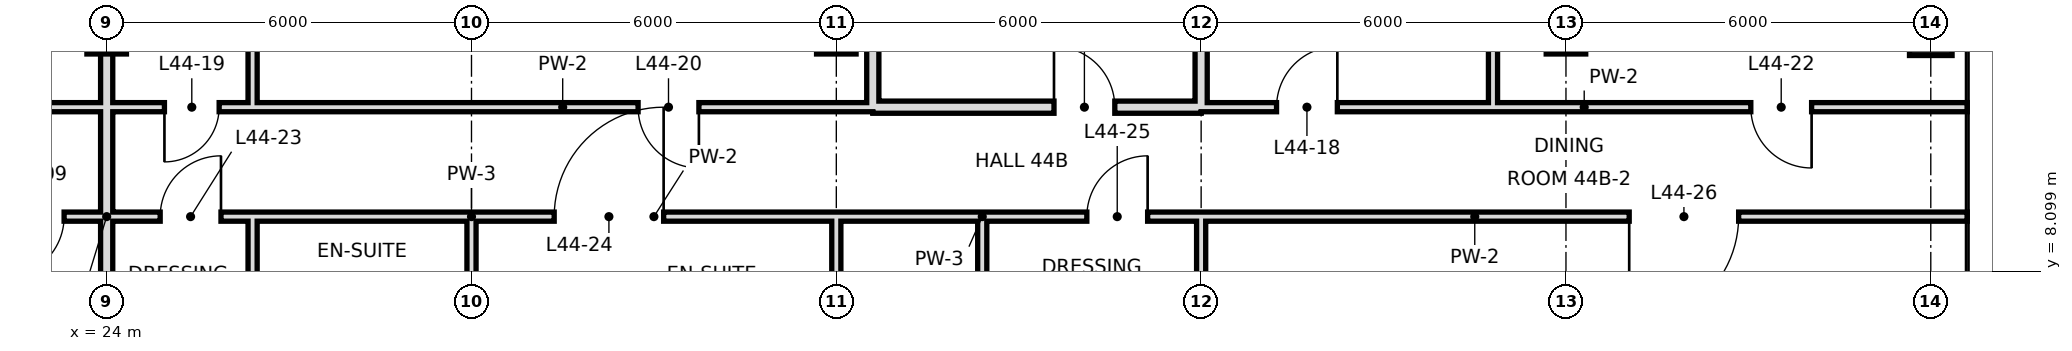
"""IFC4 building model, lengths in metres.
Left out: names, types, materials, properties, quantities, classifications, styles, units other than length and angle.
Written with IfcOpenShell. Run it as: python <this file> out.ifc"""

import sys

from ifc_helpers import new_model, si_unit, direction, frame, frame_2d, origin, origin_2d, place, context, subcontext, project, spatial, rectangle, hollow_rectangle, extrude, element, fill, save


model = new_model("IFC4")
c1 = context("Model", 3, precision=1e-05, world=origin(), true_north=direction((0.0, 1.0)))
c2 = subcontext(c1, "Body", "Model", "MODEL_VIEW")
j1 = project(units=[si_unit("LENGTHUNIT", "METRE"), si_unit("PLANEANGLEUNIT", "RADIAN")], contexts=[c1])
p1 = place(None, origin())
s1 = spatial("IfcSite", under=j1, at=p1, CompositionType="ELEMENT")
p2 = place(p1, origin())
s2 = spatial("IfcBuilding", under=s1, at=p2, CompositionType="ELEMENT")
p3 = place(p2, frame((0.0, 0.0, 192.0)))
s3 = spatial("IfcBuildingStorey", under=s2, at=p3, CompositionType="ELEMENT", Elevation=192.0)
for number, where, z_axis, x_axis in (
    (1, (24.0, 12.0, 0.0), (0.0, 0.0, 1.0), (1.0, 0.0, 0.0)),
    (2, (36.0, 12.0, 0.0), (0.0, 0.0, 1.0), (1.0, 0.0, 0.0)),
    (3, (48.0, 12.0, 0.0), (0.0, 0.0, 1.0), (1.0, 0.0, 0.0)),
):
    element("IfcColumn", number, at=place(p3, frame(where, z_axis=z_axis, x_axis=x_axis)), inside=s3, PredefinedType="COLUMN", context=c2, shape_type="SweptSolid", body=[
        extrude(hollow_rectangle(XDim=0.65, YDim=0.65, WallThickness=0.032, at=origin_2d()), origin(), (0.0, 0.0, 1.0), 3.6),
    ])
p4 = place(p3, frame((54.0, 12.0, -0.3), z_axis=(0.0, 0.0, 1.0), x_axis=(1.0, 0.0, 0.0)))
e4 = element("IfcColumn", 4, at=p4, inside=s3, PredefinedType="COLUMN", context=c2, shape_type="SweptSolid", body=[
    extrude(hollow_rectangle(XDim=0.7, YDim=0.7, WallThickness=0.036, at=origin_2d()), origin(), (0.0, 0.0, 1.0), 3.9),
])
p5 = place(p3, frame((24.0, 0.0, 0.0), z_axis=(0.0, 0.0, 1.0), x_axis=(0.0, 1.0, 0.0)))
e5 = element("IfcWall", 5, at=p5, inside=s3, PredefinedType="SOLIDWALL", context=c2, shape_type="SweptSolid", body=[
    extrude(rectangle(XDim=15.3, YDim=0.2, at=frame_2d((7.65, 0.0))), origin(), (0.0, 0.0, 1.0), 2.72),
])
p6 = place(p3, frame((26.4, 6.0, 0.0), z_axis=(0.0, 0.0, 1.0), x_axis=(0.0, 1.0, 0.0)))
e6 = element("IfcWall", 6, at=p6, inside=s3, PredefinedType="PARTITIONING", context=c2, shape_type="SweptSolid", body=[
    extrude(rectangle(XDim=3.0, YDim=0.15, at=frame_2d((1.5, 0.0))), origin(), (0.0, 0.0, 1.0), 3.42),
])
p7 = place(p3, frame((26.4, 10.8, 0.0), z_axis=(0.0, 0.0, 1.0), x_axis=(0.0, 1.0, 0.0)))
e7 = element("IfcWall", 7, at=p7, inside=s3, PredefinedType="PARTITIONING", context=c2, shape_type="SweptSolid", body=[
    extrude(rectangle(XDim=4.5, YDim=0.15, at=frame_2d((2.25, 0.0))), origin(), (0.0, 0.0, 1.0), 3.42),
])
for number, where, z_axis, x_axis in (
    (8, (30.0, 6.0, 0.0), (0.0, 0.0, 1.0), (0.0, 1.0, 0.0)),
    (9, (36.0, 6.0, 0.0), (0.0, 0.0, 1.0), (0.0, 1.0, 0.0)),
):
    element("IfcWall", number, at=place(p3, frame(where, z_axis=z_axis, x_axis=x_axis)), inside=s3, PredefinedType="PARTITIONING", context=c2, shape_type="SweptSolid", body=[
        extrude(rectangle(XDim=3.0, YDim=0.15, at=frame_2d((1.5, 0.0))), origin(), (0.0, 0.0, 1.0), 2.72),
    ])
p8 = place(p3, frame((36.6, 10.8, 0.0), z_axis=(0.0, 0.0, 1.0), x_axis=(0.0, 1.0, 0.0)))
e10 = element("IfcWall", 10, at=p8, inside=s3, PredefinedType="SOLIDWALL", context=c2, shape_type="SweptSolid", body=[
    extrude(rectangle(XDim=4.5, YDim=0.2, at=frame_2d((2.25, 0.0))), origin(), (0.0, 0.0, 1.0), 2.72),
])
p9 = place(p3, frame((38.4, 6.0, 0.0), z_axis=(0.0, 0.0, 1.0), x_axis=(0.0, 1.0, 0.0)))
e11 = element("IfcWall", 11, at=p9, inside=s3, PredefinedType="PARTITIONING", context=c2, shape_type="SweptSolid", body=[
    extrude(rectangle(XDim=3.0, YDim=0.15, at=frame_2d((1.5, 0.0))), origin(), (0.0, 0.0, 1.0), 3.42),
])
p10 = place(p3, frame((42.0, 10.8, 0.0), z_axis=(0.0, 0.0, 1.0), x_axis=(0.0, 1.0, 0.0)))
e12 = element("IfcWall", 12, at=p10, inside=s3, PredefinedType="SOLIDWALL", context=c2, shape_type="SweptSolid", body=[
    extrude(rectangle(XDim=4.5, YDim=0.2, at=frame_2d((2.25, 0.0))), origin(), (0.0, 0.0, 1.0), 2.72),
])
p11 = place(p3, frame((42.0, -0.6, 0.0), z_axis=(0.0, 0.0, 1.0), x_axis=(0.0, 1.0, 0.0)))
e13 = element("IfcWall", 13, at=p11, inside=s3, PredefinedType="PARTITIONING", context=c2, shape_type="SweptSolid", body=[
    extrude(rectangle(XDim=9.6, YDim=0.15, at=frame_2d((4.8, 0.0))), origin(), (0.0, 0.0, 1.0), 2.72),
])
p12 = place(p3, frame((46.8, 10.8, 0.0), z_axis=(0.0, 0.0, 1.0), x_axis=(0.0, 1.0, 0.0)))
e14 = element("IfcWall", 14, at=p12, inside=s3, PredefinedType="PARTITIONING", context=c2, shape_type="SweptSolid", body=[
    extrude(rectangle(XDim=4.5, YDim=0.15, at=frame_2d((2.25, 0.0))), origin(), (0.0, 0.0, 1.0), 3.42),
])
p13 = place(p3, frame((36.6, 10.8, 0.0), z_axis=(0.0, 0.0, 1.0), x_axis=(1.0, 0.0, 0.0)))
e15 = element("IfcWall", 15, at=p13, inside=s3, PredefinedType="SOLIDWALL", context=c2, shape_type="SweptSolid", body=[
    extrude(rectangle(XDim=5.4, YDim=0.2, at=frame_2d((2.7, 0.0))), origin(), (0.0, 0.0, 1.0), 2.72),
])
p14 = place(p13, frame((2.98, 0.0, 0.0)))
e16 = element("IfcOpeningElement", 16, at=p14, cuts=e15, PredefinedType="OPENING", context=c2, shape_type="SweptSolid", body=[
    extrude(rectangle(XDim=1.0, YDim=2.4, at=frame_2d((0.5, 1.2))), frame((0.0, 0.11, 0.0), z_axis=(0.0, -1.0, 0.0), x_axis=(1.0, 0.0, 0.0)), (0.0, 0.0, 1.0), 0.22),
])
p15 = place(p3, frame((7.8, 10.8, 0.0), z_axis=(0.0, 0.0, 1.0), x_axis=(1.0, 0.0, 0.0)))
e17 = element("IfcWall", 17, at=p15, inside=s3, PredefinedType="PARTITIONING", context=c2, shape_type="SweptSolid", body=[
    extrude(rectangle(XDim=16.2, YDim=0.15, at=frame_2d((8.1, 0.0))), origin(), (0.0, 0.0, 1.0), 3.42),
])
p16 = place(p15, frame((2.5, 0.0, 0.0)))
e18 = element("IfcOpeningElement", 18, at=p16, cuts=e17, PredefinedType="OPENING", context=c2, shape_type="SweptSolid", body=[
    extrude(rectangle(XDim=1.0, YDim=2.4, at=frame_2d((0.5, 1.2))), frame((0.0, 0.085, 0.0), z_axis=(0.0, -1.0, 0.0), x_axis=(1.0, 0.0, 0.0)), (0.0, 0.0, 1.0), 0.17),
])
p17 = place(p15, frame((8.86, 0.0, 0.0)))
e19 = element("IfcOpeningElement", 19, at=p17, cuts=e17, PredefinedType="OPENING", context=c2, shape_type="SweptSolid", body=[
    extrude(rectangle(XDim=1.0, YDim=2.4, at=frame_2d((0.5, 1.2))), frame((0.0, 0.085, 0.0), z_axis=(0.0, -1.0, 0.0), x_axis=(1.0, 0.0, 0.0)), (0.0, 0.0, 1.0), 0.17),
])
p18 = place(p3, frame((26.4, 10.8, 0.0), z_axis=(0.0, 0.0, 1.0), x_axis=(1.0, 0.0, 0.0)))
e20 = element("IfcWall", 20, at=p18, inside=s3, PredefinedType="PARTITIONING", context=c2, shape_type="SweptSolid", body=[
    extrude(rectangle(XDim=10.2, YDim=0.15, at=frame_2d((5.1, 0.0))), origin(), (0.0, 0.0, 1.0), 3.42),
])
p19 = place(p18, frame((6.34, 0.0, 0.0)))
e21 = element("IfcOpeningElement", 21, at=p19, cuts=e20, PredefinedType="OPENING", context=c2, shape_type="SweptSolid", body=[
    extrude(rectangle(XDim=1.0, YDim=2.4, at=frame_2d((0.5, 1.2))), frame((0.0, 0.085, 0.0), z_axis=(0.0, -1.0, 0.0), x_axis=(1.0, 0.0, 0.0)), (0.0, 0.0, 1.0), 0.17),
])
p20 = place(p3, frame((42.0, 10.8, 0.0), z_axis=(0.0, 0.0, 1.0), x_axis=(1.0, 0.0, 0.0)))
e22 = element("IfcWall", 22, at=p20, inside=s3, PredefinedType="PARTITIONING", context=c2, shape_type="SweptSolid", body=[
    extrude(rectangle(XDim=12.6, YDim=0.15, at=frame_2d((6.3, 0.0))), origin(), (0.0, 0.0, 1.0), 3.42),
])
p21 = place(p20, frame((1.24, 0.0, 0.0)))
e23 = element("IfcOpeningElement", 23, at=p21, cuts=e22, PredefinedType="OPENING", context=c2, shape_type="SweptSolid", body=[
    extrude(rectangle(XDim=1.0, YDim=2.4, at=frame_2d((0.5, 1.2))), frame((0.0, 0.085, 0.0), z_axis=(0.0, -1.0, 0.0), x_axis=(1.0, 0.0, 0.0)), (0.0, 0.0, 1.0), 0.17),
])
p22 = place(p20, frame((9.04, 0.0, 0.0)))
e24 = element("IfcOpeningElement", 24, at=p22, cuts=e22, PredefinedType="OPENING", context=c2, shape_type="SweptSolid", body=[
    extrude(rectangle(XDim=1.0, YDim=2.4, at=frame_2d((0.5, 1.2))), frame((0.0, 0.085, 0.0), z_axis=(0.0, -1.0, 0.0), x_axis=(1.0, 0.0, 0.0)), (0.0, 0.0, 1.0), 0.17),
])
p23 = place(p3, frame((24.0, 10.8, 0.0), z_axis=(0.0, 0.0, 1.0), x_axis=(1.0, 0.0, 0.0)))
e25 = element("IfcWall", 25, at=p23, inside=s3, PredefinedType="PARTITIONING", context=c2, shape_type="SweptSolid", body=[
    extrude(rectangle(XDim=2.4, YDim=0.15, at=frame_2d((1.2, 0.0))), origin(), (0.0, 0.0, 1.0), 3.42),
])
p24 = place(p23, frame((0.95, 0.0, 0.0)))
e26 = element("IfcOpeningElement", 26, at=p24, cuts=e25, PredefinedType="OPENING", context=c2, shape_type="SweptSolid", body=[
    extrude(rectangle(XDim=0.9, YDim=2.4, at=frame_2d((0.45, 1.2))), frame((0.0, 0.085, 0.0), z_axis=(0.0, -1.0, 0.0), x_axis=(1.0, 0.0, 0.0)), (0.0, 0.0, 1.0), 0.17),
])
p25 = place(p3, frame((21.6, 9.0, 0.0), z_axis=(0.0, 0.0, 1.0), x_axis=(1.0, 0.0, 0.0)))
e27 = element("IfcWall", 27, at=p25, inside=s3, PredefinedType="PARTITIONING", context=c2, shape_type="SweptSolid", body=[
    extrude(rectangle(XDim=4.8, YDim=0.15, at=frame_2d((2.4, 0.0))), origin(), (0.0, 0.0, 1.0), 3.42),
])
p26 = place(p25, frame((0.7, 0.0, 0.0)))
e28 = element("IfcOpeningElement", 28, at=p26, cuts=e27, PredefinedType="OPENING", context=c2, shape_type="SweptSolid", body=[
    extrude(rectangle(XDim=1.0, YDim=2.4, at=frame_2d((0.5, 1.2))), frame((0.0, 0.085, 0.0), z_axis=(0.0, -1.0, 0.0), x_axis=(1.0, 0.0, 0.0)), (0.0, 0.0, 1.0), 0.17),
])
p27 = place(p25, frame((3.28, 0.0, 0.0)))
e29 = element("IfcOpeningElement", 29, at=p27, cuts=e27, PredefinedType="OPENING", context=c2, shape_type="SweptSolid", body=[
    extrude(rectangle(XDim=1.0, YDim=2.4, at=frame_2d((0.5, 1.2))), frame((0.0, 0.085, 0.0), z_axis=(0.0, -1.0, 0.0), x_axis=(1.0, 0.0, 0.0)), (0.0, 0.0, 1.0), 0.17),
])
p28 = place(p3, frame((30.0, 9.0, 0.0), z_axis=(0.0, 0.0, 1.0), x_axis=(1.0, 0.0, 0.0)))
e30 = element("IfcWall", 30, at=p28, inside=s3, PredefinedType="PARTITIONING", context=c2, shape_type="SweptSolid", body=[
    extrude(rectangle(XDim=6.0, YDim=0.15, at=frame_2d((3.0, 0.0))), origin(), (0.0, 0.0, 1.0), 3.42),
])
p29 = place(p28, frame((1.36, 0.0, 0.0)))
e31 = element("IfcOpeningElement", 31, at=p29, cuts=e30, PredefinedType="OPENING", context=c2, shape_type="SweptSolid", body=[
    extrude(rectangle(XDim=1.8, YDim=2.4, at=frame_2d((0.9, 1.2))), frame((0.0, 0.085, 0.0), z_axis=(0.0, -1.0, 0.0), x_axis=(1.0, 0.0, 0.0)), (0.0, 0.0, 1.0), 0.17),
])
p30 = place(p3, frame((38.4, 9.0, 0.0), z_axis=(0.0, 0.0, 1.0), x_axis=(1.0, 0.0, 0.0)))
e32 = element("IfcWall", 32, at=p30, inside=s3, PredefinedType="PARTITIONING", context=c2, shape_type="SweptSolid", body=[
    extrude(rectangle(XDim=16.2, YDim=0.15, at=frame_2d((8.1, 0.0))), origin(), (0.0, 0.0, 1.0), 3.42),
])
p31 = place(p30, frame((1.72, 0.0, 0.0)))
e33 = element("IfcOpeningElement", 33, at=p31, cuts=e32, PredefinedType="OPENING", context=c2, shape_type="SweptSolid", body=[
    extrude(rectangle(XDim=1.0, YDim=2.4, at=frame_2d((0.5, 1.2))), frame((0.0, 0.085, 0.0), z_axis=(0.0, -1.0, 0.0), x_axis=(1.0, 0.0, 0.0)), (0.0, 0.0, 1.0), 0.17),
])
p32 = place(p30, frame((10.64, 0.0, 0.0)))
e34 = element("IfcOpeningElement", 34, at=p32, cuts=e32, PredefinedType="OPENING", context=c2, shape_type="SweptSolid", body=[
    extrude(rectangle(XDim=1.8, YDim=2.4, at=frame_2d((0.9, 1.2))), frame((0.0, 0.085, 0.0), z_axis=(0.0, -1.0, 0.0), x_axis=(1.0, 0.0, 0.0)), (0.0, 0.0, 1.0), 0.17),
])
p33 = place(p3, frame((26.4, 9.0, 0.0), z_axis=(0.0, 0.0, 1.0), x_axis=(1.0, 0.0, 0.0)))
e35 = element("IfcWall", 35, at=p33, inside=s3, PredefinedType="PARTITIONING", context=c2, shape_type="SweptSolid", body=[
    extrude(rectangle(XDim=3.6, YDim=0.15, at=frame_2d((1.8, 0.0))), origin(), (0.0, 0.0, 1.0), 3.42),
])
p34 = place(p3, frame((36.0, 9.0, 0.0), z_axis=(0.0, 0.0, 1.0), x_axis=(1.0, 0.0, 0.0)))
e36 = element("IfcWall", 36, at=p34, inside=s3, PredefinedType="PARTITIONING", context=c2, shape_type="SweptSolid", body=[
    extrude(rectangle(XDim=2.4, YDim=0.15, at=frame_2d((1.2, 0.0))), origin(), (0.0, 0.0, 1.0), 3.42),
])
p35 = place(p26, frame((1.0, 0.0, 0.0), z_axis=(0.0, 0.0, 1.0), x_axis=(-1.0, 0.0, 0.0)))
e37 = element("IfcDoor", 37, at=p35, inside=s3, OperationType="SINGLE_SWING_RIGHT", PredefinedType="DOOR", context=c2, shape_type="SweptSolid", body=[
    extrude(rectangle(XDim=1.0, YDim=2.4, at=frame_2d((0.5, 1.2))), frame((0.0, 0.025, 0.0), z_axis=(0.0, -1.0, 0.0), x_axis=(1.0, 0.0, 0.0)), (0.0, 0.0, 1.0), 0.05),
])
fill(e28, e37)
p36 = place(p21, frame((1.0, 0.0, 0.0), z_axis=(0.0, 0.0, 1.0), x_axis=(-1.0, 0.0, 0.0)))
e38 = element("IfcDoor", 38, at=p36, inside=s3, OperationType="SINGLE_SWING_LEFT", PredefinedType="DOOR", context=c2, shape_type="SweptSolid", body=[
    extrude(rectangle(XDim=1.0, YDim=2.4, at=frame_2d((0.5, 1.2))), frame((0.0, 0.025, 0.0), z_axis=(0.0, -1.0, 0.0), x_axis=(1.0, 0.0, 0.0)), (0.0, 0.0, 1.0), 0.05),
])
fill(e23, e38)
p37 = place(p24, frame((0.9, 0.0, 0.0), z_axis=(0.0, 0.0, 1.0), x_axis=(-1.0, 0.0, 0.0)))
e39 = element("IfcDoor", 39, at=p37, inside=s3, OperationType="SINGLE_SWING_RIGHT", PredefinedType="DOOR", context=c2, shape_type="SweptSolid", body=[
    extrude(rectangle(XDim=0.9, YDim=2.4, at=frame_2d((0.45, 1.2))), frame((0.0, 0.025, 0.0), z_axis=(0.0, -1.0, 0.0), x_axis=(1.0, 0.0, 0.0)), (0.0, 0.0, 1.0), 0.05),
])
fill(e26, e39)
p38 = place(p19, origin())
e40 = element("IfcDoor", 40, at=p38, inside=s3, OperationType="SINGLE_SWING_RIGHT", PredefinedType="DOOR", context=c2, shape_type="SweptSolid", body=[
    extrude(rectangle(XDim=1.0, YDim=2.4, at=frame_2d((0.5, 1.2))), frame((0.0, 0.025, 0.0), z_axis=(0.0, -1.0, 0.0), x_axis=(1.0, 0.0, 0.0)), (0.0, 0.0, 1.0), 0.05),
])
fill(e21, e40)
p39 = place(p14, origin())
e41 = element("IfcDoor", 41, at=p39, inside=s3, OperationType="SINGLE_SWING_LEFT", PredefinedType="DOOR", context=c2, shape_type="SweptSolid", body=[
    extrude(rectangle(XDim=1.0, YDim=2.4, at=frame_2d((0.5, 1.2))), frame((0.0, 0.025, 0.0), z_axis=(0.0, -1.0, 0.0), x_axis=(1.0, 0.0, 0.0)), (0.0, 0.0, 1.0), 0.05),
])
fill(e16, e41)
p40 = place(p22, origin())
e42 = element("IfcDoor", 42, at=p40, inside=s3, OperationType="SINGLE_SWING_RIGHT", PredefinedType="DOOR", context=c2, shape_type="SweptSolid", body=[
    extrude(rectangle(XDim=1.0, YDim=2.4, at=frame_2d((0.5, 1.2))), frame((0.0, 0.025, 0.0), z_axis=(0.0, -1.0, 0.0), x_axis=(1.0, 0.0, 0.0)), (0.0, 0.0, 1.0), 0.05),
])
fill(e24, e42)
p41 = place(p27, frame((1.0, 0.0, 0.0), z_axis=(0.0, 0.0, 1.0), x_axis=(-1.0, 0.0, 0.0)))
e43 = element("IfcDoor", 43, at=p41, inside=s3, OperationType="SINGLE_SWING_LEFT", PredefinedType="DOOR", context=c2, shape_type="SweptSolid", body=[
    extrude(rectangle(XDim=1.0, YDim=2.4, at=frame_2d((0.5, 1.2))), frame((0.0, 0.025, 0.0), z_axis=(0.0, -1.0, 0.0), x_axis=(1.0, 0.0, 0.0)), (0.0, 0.0, 1.0), 0.05),
])
fill(e29, e43)
p42 = place(p29, frame((1.8, 0.0, 0.0), z_axis=(0.0, 0.0, 1.0), x_axis=(-1.0, 0.0, 0.0)))
e44 = element("IfcDoor", 44, at=p42, inside=s3, OperationType="SINGLE_SWING_LEFT", PredefinedType="DOOR", context=c2, shape_type="SweptSolid", body=[
    extrude(rectangle(XDim=1.8, YDim=2.4, at=frame_2d((0.9, 1.2))), frame((0.0, 0.025, 0.0), z_axis=(0.0, -1.0, 0.0), x_axis=(1.0, 0.0, 0.0)), (0.0, 0.0, 1.0), 0.05),
])
fill(e31, e44)
p43 = place(p31, frame((1.0, 0.0, 0.0), z_axis=(0.0, 0.0, 1.0), x_axis=(-1.0, 0.0, 0.0)))
e45 = element("IfcDoor", 45, at=p43, inside=s3, OperationType="SINGLE_SWING_LEFT", PredefinedType="DOOR", context=c2, shape_type="SweptSolid", body=[
    extrude(rectangle(XDim=1.0, YDim=2.4, at=frame_2d((0.5, 1.2))), frame((0.0, 0.025, 0.0), z_axis=(0.0, -1.0, 0.0), x_axis=(1.0, 0.0, 0.0)), (0.0, 0.0, 1.0), 0.05),
])
fill(e33, e45)
p44 = place(p32, frame((1.8, 0.0, 0.0), z_axis=(0.0, 0.0, 1.0), x_axis=(-1.0, 0.0, 0.0)))
e46 = element("IfcDoor", 46, at=p44, inside=s3, OperationType="SINGLE_SWING_RIGHT", PredefinedType="DOOR", context=c2, shape_type="SweptSolid", body=[
    extrude(rectangle(XDim=1.8, YDim=2.4, at=frame_2d((0.9, 1.2))), frame((0.0, 0.025, 0.0), z_axis=(0.0, -1.0, 0.0), x_axis=(1.0, 0.0, 0.0)), (0.0, 0.0, 1.0), 0.05),
])
fill(e34, e46)
save(model, sys.argv[1])
